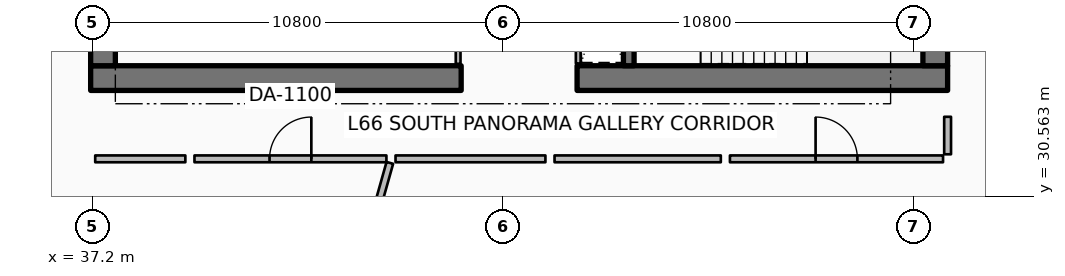
"""IFC4 building model, lengths in metres.
Left out: names, types, materials, properties, quantities, classifications, styles, units other than length and angle.
Written with IfcOpenShell. Run it as: python <this file> out.ifc"""

import sys

from ifc_helpers import new_model, si_unit, direction, frame, frame_2d, origin, place, context, subcontext, project, spatial, rectangle, extrude, element, fill, save


model = new_model("IFC4")
c1 = context("Model", 3, precision=1e-05, world=origin(), true_north=direction((0.0, 1.0)))
c2 = subcontext(c1, "Body", "Model", "MODEL_VIEW")
j1 = project(units=[si_unit("LENGTHUNIT", "METRE"), si_unit("PLANEANGLEUNIT", "RADIAN")], contexts=[c1])
p1 = place(None, origin())
s1 = spatial("IfcSite", under=j1, at=p1, CompositionType="ELEMENT")
p2 = place(p1, origin())
s2 = spatial("IfcBuilding", under=s1, at=p2, CompositionType="ELEMENT")
p3 = place(p2, frame((0.0, 0.0, 263.65)))
s3 = spatial("IfcBuildingStorey", under=s2, at=p3, CompositionType="ELEMENT", Elevation=263.65)
for number, where, z_axis, x_axis in (
    (1, (37.15, 33.675, 0.0), (0.0, 0.0, 1.0), (1.0, 0.0, 0.0)),
    (2, (49.95, 33.675, 0.0), (0.0, 0.0, 1.0), (1.0, 0.0, 0.0)),
):
    element("IfcWall", number, at=place(p3, frame(where, z_axis=z_axis, x_axis=x_axis)), inside=s3, PredefinedType="SHEAR", context=c2, shape_type="SweptSolid", body=[
        extrude(rectangle(XDim=9.75, YDim=0.65, at=frame_2d((4.875, 0.0))), origin(), (0.0, 0.0, 1.0), 3.85),
    ])
for number, where, z_axis, x_axis in (
    (3, (37.475, 34.0, 0.0), (0.0, 0.0, 1.0), (0.0, 1.0, 0.0)),
    (4, (59.375, 34.0, 0.0), (0.0, 0.0, 1.0), (0.0, 1.0, 0.0)),
):
    element("IfcWall", number, at=place(p3, frame(where, z_axis=z_axis, x_axis=x_axis)), inside=s3, PredefinedType="SHEAR", context=c2, shape_type="SweptSolid", body=[
        extrude(rectangle(XDim=16.0, YDim=0.65, at=frame_2d((8.0, 0.0))), origin(), (0.0, 0.0, 1.0), 3.85),
    ])
p4 = place(p3, frame((51.31, 34.0, 0.0), z_axis=(0.0, 0.0, 1.0), x_axis=(0.0, 1.0, 0.0)))
e5 = element("IfcWall", 5, at=p4, inside=s3, PredefinedType="SHEAR", context=c2, shape_type="SweptSolid", body=[
    extrude(rectangle(XDim=3.5, YDim=0.28, at=frame_2d((1.75, 0.0))), origin(), (0.0, 0.0, 1.0), 3.85),
])
p5 = place(p3, frame((46.82, 34.05, 0.0), z_axis=(0.0, 0.0, 1.0), x_axis=(0.0, 1.0, 0.0)))
e6 = element("IfcWall", 6, at=p5, inside=s3, PredefinedType="PARTITIONING", context=c2, shape_type="SweptSolid", body=[
    extrude(rectangle(XDim=2.03, YDim=0.125, at=frame_2d((1.015, 0.0))), origin(), (0.0, 0.0, 1.0), 3.03),
])
p6 = place(p3, frame((49.98, 34.06, 0.0), z_axis=(0.0, 0.0, 1.0), x_axis=(0.0, 1.0, 0.0)))
e7 = element("IfcWall", 7, at=p6, inside=s3, PredefinedType="PARTITIONING", context=c2, shape_type="SweptSolid", body=[
    extrude(rectangle(XDim=3.4, YDim=0.125, at=frame_2d((1.7, 0.0))), origin(), (0.0, 0.0, 1.0), 3.03),
])
p7 = place(p3, frame((45.023, 31.444, 0.0), z_axis=(0.0, 0.0, 1.0), x_axis=(-0.271442063103, -0.962454781472, 0.0)))
e8 = element("IfcWall", 8, at=p7, inside=s3, PredefinedType="PARTITIONING", context=c2, shape_type="SweptSolid", body=[
    extrude(rectangle(XDim=16.017, YDim=0.18, at=frame_2d((8.008, 0.0))), origin(), (0.0, 0.0, 1.0), 2.957),
])
p8 = place(p3, frame((39.882, 31.55, 0.0), z_axis=(0.0, 0.0, 1.0), x_axis=(1.0, 0.0, 0.0)))
e9 = element("IfcWall", 9, at=p8, inside=s3, PredefinedType="PARTITIONING", context=c2, shape_type="SweptSolid", body=[
    extrude(rectangle(XDim=5.051, YDim=0.18, at=frame_2d((2.525, 0.0))), origin(), (0.0, 0.0, 1.0), 2.957),
])
p9 = place(p8, frame((1.975, 0.0, 0.0)))
e10 = element("IfcOpeningElement", 10, at=p9, cuts=e9, PredefinedType="OPENING", context=c2, shape_type="SweptSolid", body=[
    extrude(rectangle(XDim=1.1, YDim=2.1, at=frame_2d((0.55, 1.05))), frame((0.0, 0.1, 0.0), z_axis=(0.0, -1.0, 0.0), x_axis=(1.0, 0.0, 0.0)), (0.0, 0.0, 1.0), 0.2),
])
p10 = place(p3, frame((37.27, 31.55, 0.0), z_axis=(0.0, 0.0, 1.0), x_axis=(1.0, 0.0, 0.0)))
e11 = element("IfcWall", 11, at=p10, inside=s3, PredefinedType="PARTITIONING", context=c2, shape_type="SweptSolid", body=[
    extrude(rectangle(XDim=2.372, YDim=0.18, at=frame_2d((1.186, 0.0))), origin(), (0.0, 0.0, 1.0), 2.957),
])
p11 = place(p3, frame((53.972, 31.55, 0.0), z_axis=(0.0, 0.0, 1.0), x_axis=(1.0, 0.0, 0.0)))
e12 = element("IfcWall", 12, at=p11, inside=s3, PredefinedType="PARTITIONING", context=c2, shape_type="SweptSolid", body=[
    extrude(rectangle(XDim=5.608, YDim=0.18, at=frame_2d((2.804, 0.0))), origin(), (0.0, 0.0, 1.0), 2.957),
])
p12 = place(p11, frame((2.254, 0.0, 0.0)))
e13 = element("IfcOpeningElement", 13, at=p12, cuts=e12, PredefinedType="OPENING", context=c2, shape_type="SweptSolid", body=[
    extrude(rectangle(XDim=1.1, YDim=2.1, at=frame_2d((0.55, 1.05))), frame((0.0, 0.1, 0.0), z_axis=(0.0, -1.0, 0.0), x_axis=(1.0, 0.0, 0.0)), (0.0, 0.0, 1.0), 0.2),
])
p13 = place(p3, frame((59.7, 31.67, 0.0), z_axis=(0.0, 0.0, 1.0), x_axis=(0.0, 1.0, 0.0)))
e14 = element("IfcWall", 14, at=p13, inside=s3, PredefinedType="PARTITIONING", context=c2, shape_type="SweptSolid", body=[
    extrude(rectangle(XDim=0.987, YDim=0.18, at=frame_2d((0.493, 0.0))), origin(), (0.0, 0.0, 1.0), 2.957),
])
p14 = place(p3, frame((45.173, 31.55, 0.0), z_axis=(0.0, 0.0, 1.0), x_axis=(1.0, 0.0, 0.0)))
e15 = element("IfcWall", 15, at=p14, inside=s3, PredefinedType="PARTITIONING", context=c2, shape_type="SweptSolid", body=[
    extrude(rectangle(XDim=3.944, YDim=0.18, at=frame_2d((1.972, 0.0))), origin(), (0.0, 0.0, 1.0), 2.957),
])
p15 = place(p3, frame((49.357, 31.55, 0.0), z_axis=(0.0, 0.0, 1.0), x_axis=(1.0, 0.0, 0.0)))
e16 = element("IfcWall", 16, at=p15, inside=s3, PredefinedType="PARTITIONING", context=c2, shape_type="SweptSolid", body=[
    extrude(rectangle(XDim=4.376, YDim=0.18, at=frame_2d((2.188, 0.0))), origin(), (0.0, 0.0, 1.0), 2.957),
])
p16 = place(p9, origin())
e17 = element("IfcDoor", 17, at=p16, inside=s3, OperationType="SINGLE_SWING_RIGHT", PredefinedType="DOOR", context=c2, shape_type="SweptSolid", body=[
    extrude(rectangle(XDim=1.1, YDim=2.1, at=frame_2d((0.55, 1.05))), frame((0.0, 0.025, 0.0), z_axis=(0.0, -1.0, 0.0), x_axis=(1.0, 0.0, 0.0)), (0.0, 0.0, 1.0), 0.05),
])
fill(e10, e17)
p17 = place(p12, origin())
e18 = element("IfcDoor", 18, at=p17, inside=s3, OperationType="SINGLE_SWING_LEFT", PredefinedType="DOOR", context=c2, shape_type="SweptSolid", body=[
    extrude(rectangle(XDim=1.1, YDim=2.1, at=frame_2d((0.55, 1.05))), frame((0.0, 0.025, 0.0), z_axis=(0.0, -1.0, 0.0), x_axis=(1.0, 0.0, 0.0)), (0.0, 0.0, 1.0), 0.05),
])
fill(e13, e18)
save(model, sys.argv[1])
